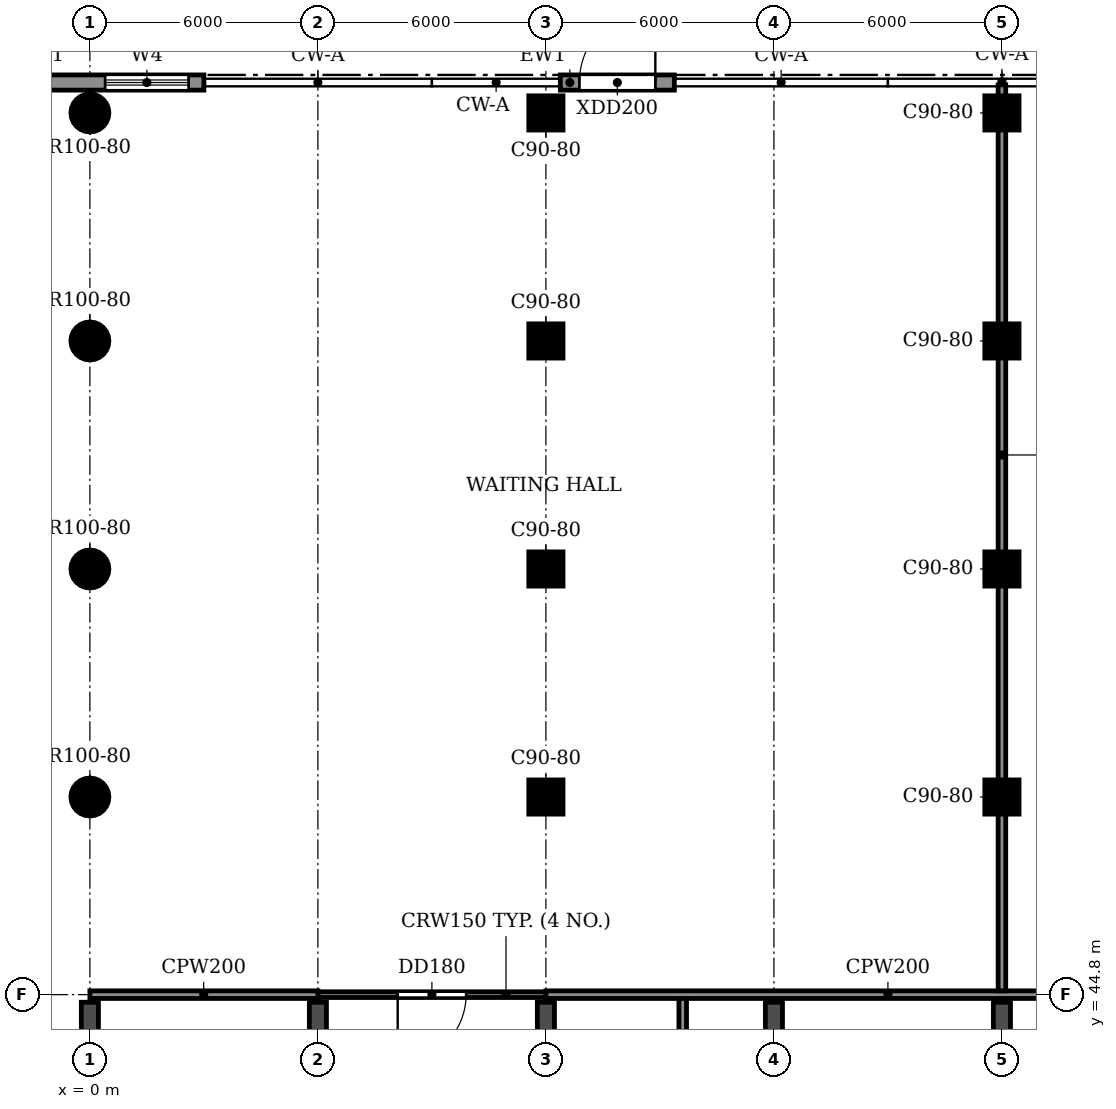
"""IFC4 building model, lengths in metres.
Left out: names, types, materials, properties, quantities, classifications, styles, units other than length and angle.
Written with IfcOpenShell. Run it as: python <this file> out.ifc"""

import sys

from ifc_helpers import new_model, si_unit, direction, frame, frame_2d, origin, origin_2d, place, context, subcontext, project, spatial, rectangle, circle, extrude, source, transform, mapped, element, fill, save


model = new_model("IFC4")
c1 = context("Model", 3, precision=1e-05, world=origin(), true_north=direction((0.0, 1.0)))
c2 = subcontext(c1, "Body", "Model", "MODEL_VIEW")
j1 = project(units=[si_unit("LENGTHUNIT", "METRE"), si_unit("PLANEANGLEUNIT", "RADIAN")], contexts=[c1])
p1 = place(None, origin())
s1 = spatial("IfcSite", under=j1, at=p1, CompositionType="ELEMENT")
p2 = place(p1, origin())
s2 = spatial("IfcBuilding", under=s1, at=p2, CompositionType="ELEMENT")
p3 = place(p2, frame((0.0, 0.0, 6.0)))
s3 = spatial("IfcBuildingStorey", under=s2, at=p3, CompositionType="ELEMENT", Elevation=6.0)
for number, where, z_axis, x_axis in (
    (1, (0.0, 30.55, 0.0), (0.0, 0.0, 1.0), (0.0, 1.0, 0.0)),
    (2, (6.0, 30.55, 0.0), (0.0, 0.0, 1.0), (0.0, 1.0, 0.0)),
    (3, (12.0, 30.55, 0.0), (0.0, 0.0, 1.0), (0.0, 1.0, 0.0)),
    (4, (18.0, 30.55, 0.0), (0.0, 0.0, 1.0), (0.0, 1.0, 0.0)),
    (5, (24.0, 30.55, 0.0), (0.0, 0.0, 1.0), (0.0, 1.0, 0.0)),
):
    element("IfcWall", number, at=place(p3, frame(where, z_axis=z_axis, x_axis=x_axis)), inside=s3, PredefinedType="SHEAR", context=c2, shape_type="SweptSolid", body=[
        extrude(rectangle(XDim=14.05, YDim=0.45, at=frame_2d((7.025, 0.0))), origin(), (0.0, 0.0, 1.0), 4.52),
    ])
m1 = source(origin(), c2, "Body", "SweptSolid", [
    extrude(circle(Radius=0.5, at=origin_2d()), origin(), (0.0, 0.0, 1.0), 4.52),
])
p4 = place(p3, frame((0.0, 68.0, 0.0), z_axis=(0.0, 0.0, 1.0), x_axis=(1.0, 0.0, 0.0)))
e6 = element("IfcColumn", 6, at=p4, inside=s3, PredefinedType="COLUMN", context=c2, shape_type="MappedRepresentation", body=[
    mapped(m1, transform((0.0, 0.0, 0.0))),
])
m2 = source(origin(), c2, "Body", "SweptSolid", [
    extrude(rectangle(XDim=0.9, YDim=0.9, at=origin_2d()), origin(), (0.0, 0.0, 1.0), 4.52),
])
for number, where, z_axis, x_axis in (
    (7, (12.0, 68.0, 0.0), (0.0, 0.0, 1.0), (1.0, 0.0, 0.0)),
    (8, (24.0, 68.0, 0.0), (0.0, 0.0, 1.0), (1.0, 0.0, 0.0)),
):
    element("IfcColumn", number, at=place(p3, frame(where, z_axis=z_axis, x_axis=x_axis)), inside=s3, PredefinedType="COLUMN", context=c2, shape_type="MappedRepresentation", body=[
        mapped(m2, transform((0.0, 0.0, 0.0))),
    ])
p5 = place(p3, frame((0.0, 62.0, 0.0), z_axis=(0.0, 0.0, 1.0), x_axis=(1.0, 0.0, 0.0)))
e9 = element("IfcColumn", 9, at=p5, inside=s3, PredefinedType="COLUMN", context=c2, shape_type="MappedRepresentation", body=[
    mapped(m1, transform((0.0, 0.0, 0.0))),
])
for number, where, z_axis, x_axis in (
    (10, (12.0, 62.0, 0.0), (0.0, 0.0, 1.0), (1.0, 0.0, 0.0)),
    (11, (24.0, 62.0, 0.0), (0.0, 0.0, 1.0), (1.0, 0.0, 0.0)),
):
    element("IfcColumn", number, at=place(p3, frame(where, z_axis=z_axis, x_axis=x_axis)), inside=s3, PredefinedType="COLUMN", context=c2, shape_type="MappedRepresentation", body=[
        mapped(m2, transform((0.0, 0.0, 0.0))),
    ])
p6 = place(p3, frame((0.0, 56.0, 0.0), z_axis=(0.0, 0.0, 1.0), x_axis=(1.0, 0.0, 0.0)))
e12 = element("IfcColumn", 12, at=p6, inside=s3, PredefinedType="COLUMN", context=c2, shape_type="MappedRepresentation", body=[
    mapped(m1, transform((0.0, 0.0, 0.0))),
])
for number, where, z_axis, x_axis in (
    (13, (12.0, 56.0, 0.0), (0.0, 0.0, 1.0), (1.0, 0.0, 0.0)),
    (14, (24.0, 56.0, 0.0), (0.0, 0.0, 1.0), (1.0, 0.0, 0.0)),
):
    element("IfcColumn", number, at=place(p3, frame(where, z_axis=z_axis, x_axis=x_axis)), inside=s3, PredefinedType="COLUMN", context=c2, shape_type="MappedRepresentation", body=[
        mapped(m2, transform((0.0, 0.0, 0.0))),
    ])
p7 = place(p3, frame((0.0, 50.0, 0.0), z_axis=(0.0, 0.0, 1.0), x_axis=(1.0, 0.0, 0.0)))
e15 = element("IfcColumn", 15, at=p7, inside=s3, PredefinedType="COLUMN", context=c2, shape_type="MappedRepresentation", body=[
    mapped(m1, transform((0.0, 0.0, 0.0))),
])
for number, where, z_axis, x_axis in (
    (16, (12.0, 50.0, 0.0), (0.0, 0.0, 1.0), (1.0, 0.0, 0.0)),
    (17, (24.0, 50.0, 0.0), (0.0, 0.0, 1.0), (1.0, 0.0, 0.0)),
):
    element("IfcColumn", number, at=place(p3, frame(where, z_axis=z_axis, x_axis=x_axis)), inside=s3, PredefinedType="COLUMN", context=c2, shape_type="MappedRepresentation", body=[
        mapped(m2, transform((0.0, 0.0, 0.0))),
    ])
p8 = place(p3, frame((15.38, 68.8, 0.0), z_axis=(0.0, 0.0, 1.0), x_axis=(-1.0, 0.0, 0.0)))
e18 = element("IfcWall", 18, at=p8, inside=s3, PredefinedType="STANDARD", context=c2, shape_type="SweptSolid", body=[
    extrude(rectangle(XDim=3.0, YDim=0.4, at=frame_2d((1.5, 0.0))), origin(), (0.0, 0.0, 1.0), 4.52),
])
p9 = place(p8, frame((0.5, 0.0, 0.0)))
e19 = element("IfcOpeningElement", 19, at=p9, cuts=e18, PredefinedType="OPENING", context=c2, shape_type="SweptSolid", body=[
    extrude(rectangle(XDim=2.0, YDim=2.4, at=frame_2d((1.0, 1.2))), frame((0.0, 0.21, 0.0), z_axis=(0.0, -1.0, 0.0), x_axis=(1.0, 0.0, 0.0)), (0.0, 0.0, 1.0), 0.42),
])
p10 = place(p3, frame((3.0, 68.8, 0.0), z_axis=(0.0, 0.0, 1.0), x_axis=(-1.0, 0.0, 0.0)))
e20 = element("IfcWall", 20, at=p10, inside=s3, PredefinedType="STANDARD", context=c2, shape_type="SweptSolid", body=[
    extrude(rectangle(XDim=6.0, YDim=0.4, at=frame_2d((3.0, 0.0))), origin(), (0.0, 0.0, 1.0), 4.52),
])
p11 = place(p10, frame((0.4, 0.0, 0.9)))
e21 = element("IfcOpeningElement", 21, at=p11, cuts=e20, PredefinedType="OPENING", context=c2, shape_type="SweptSolid", body=[
    extrude(rectangle(XDim=2.2, YDim=2.7, at=frame_2d((1.1, 1.35))), frame((0.0, 0.21, 0.0), z_axis=(0.0, -1.0, 0.0), x_axis=(1.0, 0.0, 0.0)), (0.0, 0.0, 1.0), 0.42),
])
p12 = place(p3, frame((6.0, 44.8, 0.0), z_axis=(0.0, 0.0, 1.0), x_axis=(1.0, 0.0, 0.0)))
e22 = element("IfcWall", 22, at=p12, inside=s3, PredefinedType="PARTITIONING", context=c2, shape_type="SweptSolid", body=[
    extrude(rectangle(XDim=6.0, YDim=0.15, at=frame_2d((3.0, 0.0))), origin(), (0.0, 0.0, 1.0), 4.52),
])
p13 = place(p12, frame((2.1, 0.0, 0.0)))
e23 = element("IfcOpeningElement", 23, at=p13, cuts=e22, PredefinedType="OPENING", context=c2, shape_type="SweptSolid", body=[
    extrude(rectangle(XDim=1.8, YDim=2.1, at=frame_2d((0.9, 1.05))), frame((0.0, 0.085, 0.0), z_axis=(0.0, -1.0, 0.0), x_axis=(1.0, 0.0, 0.0)), (0.0, 0.0, 1.0), 0.17),
])
p14 = place(p3, frame((0.0, 44.8, 0.0), z_axis=(0.0, 0.0, 1.0), x_axis=(1.0, 0.0, 0.0)))
e24 = element("IfcWall", 24, at=p14, inside=s3, PredefinedType="PARTITIONING", context=c2, shape_type="SweptSolid", body=[
    extrude(rectangle(XDim=6.0, YDim=0.2, at=frame_2d((3.0, 0.0))), origin(), (0.0, 0.0, 1.0), 4.52),
])
p15 = place(p3, frame((12.0, 44.8, 0.0), z_axis=(0.0, 0.0, 1.0), x_axis=(1.0, 0.0, 0.0)))
e25 = element("IfcWall", 25, at=p15, inside=s3, PredefinedType="PARTITIONING", context=c2, shape_type="SweptSolid", body=[
    extrude(rectangle(XDim=18.0, YDim=0.2, at=frame_2d((9.0, 0.0))), origin(), (0.0, 0.0, 1.0), 4.52),
])
p16 = place(p3, frame((15.6, 32.875, 0.0), z_axis=(0.0, 0.0, 1.0), x_axis=(0.0, 1.0, 0.0)))
e26 = element("IfcWall", 26, at=p16, inside=s3, PredefinedType="PARTITIONING", context=c2, shape_type="SweptSolid", body=[
    extrude(rectangle(XDim=11.825, YDim=0.2, at=frame_2d((5.913, 0.0))), origin(), (0.0, 0.0, 1.0), 4.52),
])
p17 = place(p3, frame((24.0, 44.9, 0.0), z_axis=(0.0, 0.0, 1.0), x_axis=(0.0, 1.0, 0.0)))
e27 = element("IfcWall", 27, at=p17, inside=s3, PredefinedType="PARTITIONING", context=c2, shape_type="SweptSolid", body=[
    extrude(rectangle(XDim=23.84, YDim=0.2, at=frame_2d((11.92, 0.0))), origin(), (0.0, 0.0, 1.0), 4.52),
])
p18 = place(p11, origin())
e28 = element("IfcWindow", 28, at=p18, inside=s3, PartitioningType="DOUBLE_PANEL_HORIZONTAL", PredefinedType="WINDOW", context=c2, shape_type="SweptSolid", body=[
    extrude(rectangle(XDim=2.2, YDim=2.7, at=frame_2d((1.1, 1.35))), frame((0.0, 0.03, 0.0), z_axis=(0.0, -1.0, 0.0), x_axis=(1.0, 0.0, 0.0)), (0.0, 0.0, 1.0), 0.06),
])
fill(e21, e28)
p19 = place(p13, frame((1.8, 0.0, 0.0), z_axis=(0.0, 0.0, 1.0), x_axis=(-1.0, 0.0, 0.0)))
e29 = element("IfcDoor", 29, at=p19, inside=s3, OperationType="DOUBLE_DOOR_SINGLE_SWING", PredefinedType="DOOR", context=c2, shape_type="SweptSolid", body=[
    extrude(rectangle(XDim=1.8, YDim=2.1, at=frame_2d((0.9, 1.05))), frame((0.0, 0.025, 0.0), z_axis=(0.0, -1.0, 0.0), x_axis=(1.0, 0.0, 0.0)), (0.0, 0.0, 1.0), 0.05),
])
fill(e23, e29)
p20 = place(p9, frame((2.0, 0.0, 0.0), z_axis=(0.0, 0.0, 1.0), x_axis=(-1.0, 0.0, 0.0)))
e30 = element("IfcDoor", 30, at=p20, inside=s3, OperationType="DOUBLE_DOOR_SINGLE_SWING", PredefinedType="DOOR", context=c2, shape_type="SweptSolid", body=[
    extrude(rectangle(XDim=2.0, YDim=2.4, at=frame_2d((1.0, 1.2))), frame((0.0, 0.025, 0.0), z_axis=(0.0, -1.0, 0.0), x_axis=(1.0, 0.0, 0.0)), (0.0, 0.0, 1.0), 0.05),
])
fill(e19, e30)
save(model, sys.argv[1])
